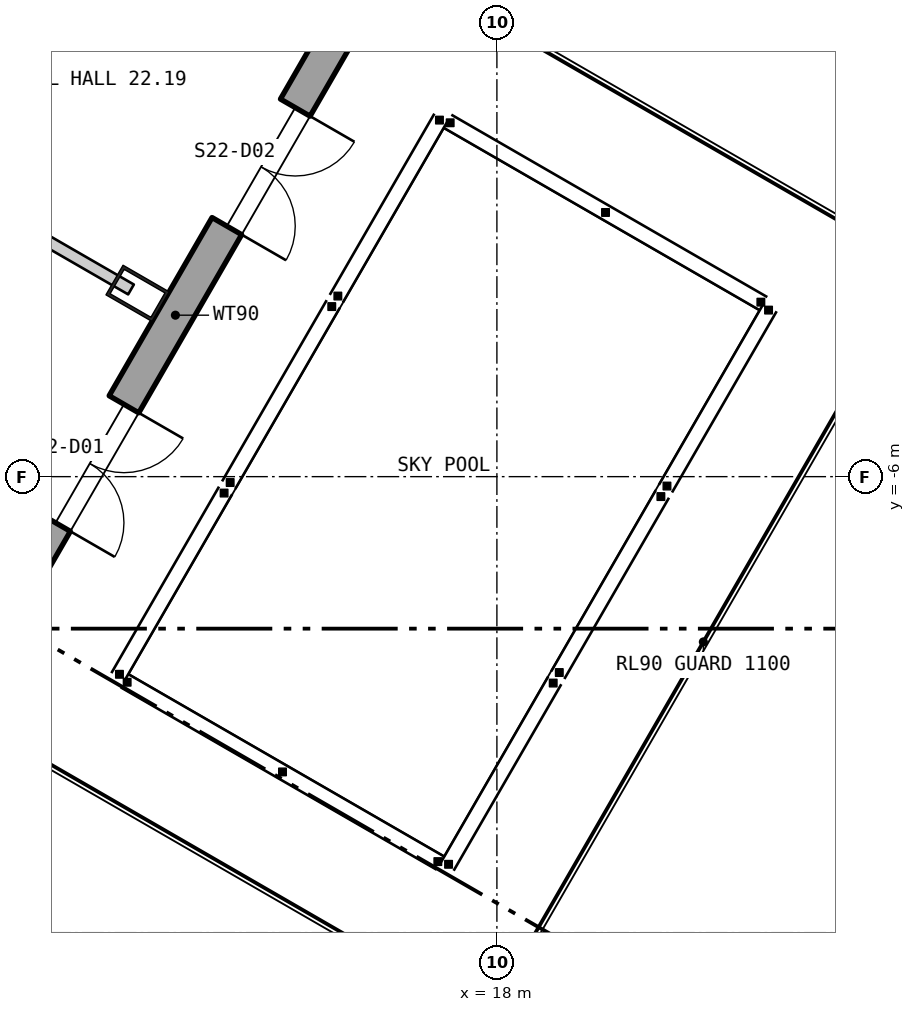
"""IFC4 building model, lengths in metres.
Left out: names, types, materials, properties, quantities, classifications, styles, units other than length and angle.
Written with IfcOpenShell. Run it as: python <this file> out.ifc"""

import sys

from ifc_helpers import new_model, si_unit, direction, frame, frame_2d, origin, origin_2d, place, context, subcontext, project, spatial, polyline, rectangle, hollow_rectangle, outline, extrude, element, fill, save


model = new_model("IFC4")
c1 = context("Model", 3, precision=1e-05, world=origin(), true_north=direction((0.0, 1.0)))
c2 = subcontext(c1, "Body", "Model", "MODEL_VIEW")
j1 = project(units=[si_unit("LENGTHUNIT", "METRE"), si_unit("PLANEANGLEUNIT", "RADIAN")], contexts=[c1])
p1 = place(None, origin())
s1 = spatial("IfcSite", under=j1, at=p1, CompositionType="ELEMENT")
p2 = place(p1, origin())
s2 = spatial("IfcBuilding", under=s1, at=p2, CompositionType="ELEMENT")
p3 = place(p2, frame((0.0, 0.0, 298.2)))
s3 = spatial("IfcBuildingStorey", under=s2, at=p3, CompositionType="ELEMENT", Elevation=298.2)
p4 = place(p3, frame((13.272, -3.588, 0.0), z_axis=(0.0, 0.0, 1.0), x_axis=(0.5, 0.866025403784, 0.0)))
e1 = element("IfcColumn", 1, at=p4, inside=s3, PredefinedType="COLUMN", context=c2, shape_type="SweptSolid", body=[
    extrude(hollow_rectangle(XDim=0.45, YDim=0.7, WallThickness=0.04, at=origin_2d()), origin(), (0.0, 0.0, 1.0), 6.0),
])
p5 = place(p3, frame((2.335, -23.682, -0.28), z_axis=(0.0, 0.0, 1.0), x_axis=(0.499999764979, 0.866025539474, 0.0)))
e2 = element("IfcWall", 2, at=p5, inside=s3, PredefinedType="SOLIDWALL", context=c2, shape_type="SweptSolid", body=[
    extrude(outline(polyline([(-0.13, -0.225), (45.87, -0.225), (45.61, 0.225), (0.13, 0.225), (-0.13, -0.225)])), origin(), (0.0, 0.0, 1.0), 6.1),
])
p6 = place(p5, frame((1.424, 0.0, 1.18)))
e3 = element("IfcOpeningElement", 3, at=p6, cuts=e2, PredefinedType="OPENING", context=c2, shape_type="SweptSolid", body=[
    extrude(rectangle(XDim=2.4, YDim=4.1, at=frame_2d((1.2, 2.05))), frame((0.0, 0.235, 0.0), z_axis=(0.0, -1.0, 0.0), x_axis=(1.0, 0.0, 0.0)), (0.0, 0.0, 1.0), 0.47),
])
p7 = place(p5, frame((5.893, 0.0, 1.18)))
e4 = element("IfcOpeningElement", 4, at=p7, cuts=e2, PredefinedType="OPENING", context=c2, shape_type="SweptSolid", body=[
    extrude(rectangle(XDim=2.4, YDim=4.1, at=frame_2d((1.2, 2.05))), frame((0.0, 0.235, 0.0), z_axis=(0.0, -1.0, 0.0), x_axis=(1.0, 0.0, 0.0)), (0.0, 0.0, 1.0), 0.47),
])
p8 = place(p5, frame((10.401, 0.0, 1.18)))
e5 = element("IfcOpeningElement", 5, at=p8, cuts=e2, PredefinedType="OPENING", context=c2, shape_type="SweptSolid", body=[
    extrude(rectangle(XDim=2.4, YDim=4.1, at=frame_2d((1.2, 2.05))), frame((0.0, 0.235, 0.0), z_axis=(0.0, -1.0, 0.0), x_axis=(1.0, 0.0, 0.0)), (0.0, 0.0, 1.0), 0.47),
])
p9 = place(p5, frame((14.909, 0.0, 1.18)))
e6 = element("IfcOpeningElement", 6, at=p9, cuts=e2, PredefinedType="OPENING", context=c2, shape_type="SweptSolid", body=[
    extrude(rectangle(XDim=2.4, YDim=4.1, at=frame_2d((1.2, 2.05))), frame((0.0, 0.235, 0.0), z_axis=(0.0, -1.0, 0.0), x_axis=(1.0, 0.0, 0.0)), (0.0, 0.0, 1.0), 0.47),
])
p10 = place(p5, frame((19.716, 0.0, 0.28)))
e7 = element("IfcOpeningElement", 7, at=p10, cuts=e2, PredefinedType="OPENING", context=c2, shape_type="SweptSolid", body=[
    extrude(rectangle(XDim=1.8, YDim=2.4, at=frame_2d((0.9, 1.2))), frame((0.0, 0.235, 0.0), z_axis=(0.0, -1.0, 0.0), x_axis=(1.0, 0.0, 0.0)), (0.0, 0.0, 1.0), 0.47),
])
p11 = place(p5, frame((24.224, 0.0, 0.28)))
e8 = element("IfcOpeningElement", 8, at=p11, cuts=e2, PredefinedType="OPENING", context=c2, shape_type="SweptSolid", body=[
    extrude(rectangle(XDim=1.8, YDim=2.4, at=frame_2d((0.9, 1.2))), frame((0.0, 0.235, 0.0), z_axis=(0.0, -1.0, 0.0), x_axis=(1.0, 0.0, 0.0)), (0.0, 0.0, 1.0), 0.47),
])
p12 = place(p5, frame((28.431, 0.0, 1.18)))
e9 = element("IfcOpeningElement", 9, at=p12, cuts=e2, PredefinedType="OPENING", context=c2, shape_type="SweptSolid", body=[
    extrude(rectangle(XDim=2.4, YDim=4.1, at=frame_2d((1.2, 2.05))), frame((0.0, 0.235, 0.0), z_axis=(0.0, -1.0, 0.0), x_axis=(1.0, 0.0, 0.0)), (0.0, 0.0, 1.0), 0.47),
])
p13 = place(p5, frame((32.939, 0.0, 1.18)))
e10 = element("IfcOpeningElement", 10, at=p13, cuts=e2, PredefinedType="OPENING", context=c2, shape_type="SweptSolid", body=[
    extrude(rectangle(XDim=2.4, YDim=4.1, at=frame_2d((1.2, 2.05))), frame((0.0, 0.235, 0.0), z_axis=(0.0, -1.0, 0.0), x_axis=(1.0, 0.0, 0.0)), (0.0, 0.0, 1.0), 0.47),
])
p14 = place(p5, frame((37.447, 0.0, 1.18)))
e11 = element("IfcOpeningElement", 11, at=p14, cuts=e2, PredefinedType="OPENING", context=c2, shape_type="SweptSolid", body=[
    extrude(rectangle(XDim=2.4, YDim=4.1, at=frame_2d((1.2, 2.05))), frame((0.0, 0.235, 0.0), z_axis=(0.0, -1.0, 0.0), x_axis=(1.0, 0.0, 0.0)), (0.0, 0.0, 1.0), 0.47),
])
p15 = place(p5, frame((41.916, 0.0, 1.18)))
e12 = element("IfcOpeningElement", 12, at=p15, cuts=e2, PredefinedType="OPENING", context=c2, shape_type="SweptSolid", body=[
    extrude(rectangle(XDim=2.4, YDim=4.1, at=frame_2d((1.2, 2.05))), frame((0.0, 0.235, 0.0), z_axis=(0.0, -1.0, 0.0), x_axis=(1.0, 0.0, 0.0)), (0.0, 0.0, 1.0), 0.47),
])
p16 = place(p3, frame((7.742, -0.396, 0.0), z_axis=(0.0, 0.0, 1.0), x_axis=(0.866169692731, -0.499750000894, 0.0)))
e13 = element("IfcWall", 13, at=p16, inside=s3, PredefinedType="PARTITIONING", context=c2, shape_type="SweptSolid", body=[
    extrude(rectangle(XDim=6.285, YDim=0.15, at=frame_2d((3.143, 0.0))), origin(), (0.0, 0.0, 1.0), 5.8),
])
p17 = place(p10, frame((1.8, 0.0, 0.0), z_axis=(0.0, 0.0, 1.0), x_axis=(-1.0, 0.0, 0.0)))
e14 = element("IfcDoor", 14, at=p17, inside=s3, OperationType="DOUBLE_DOOR_SINGLE_SWING", PredefinedType="DOOR", context=c2, shape_type="SweptSolid", body=[
    extrude(rectangle(XDim=1.8, YDim=2.4, at=frame_2d((0.9, 1.2))), frame((0.0, 0.025, 0.0), z_axis=(0.0, -1.0, 0.0), x_axis=(1.0, 0.0, 0.0)), (0.0, 0.0, 1.0), 0.05),
])
fill(e7, e14)
p18 = place(p11, frame((1.8, 0.0, 0.0), z_axis=(0.0, 0.0, 1.0), x_axis=(-1.0, 0.0, 0.0)))
e15 = element("IfcDoor", 15, at=p18, inside=s3, OperationType="DOUBLE_DOOR_SINGLE_SWING", PredefinedType="DOOR", context=c2, shape_type="SweptSolid", body=[
    extrude(rectangle(XDim=1.8, YDim=2.4, at=frame_2d((0.9, 1.2))), frame((0.0, 0.025, 0.0), z_axis=(0.0, -1.0, 0.0), x_axis=(1.0, 0.0, 0.0)), (0.0, 0.0, 1.0), 0.05),
])
fill(e8, e15)
save(model, sys.argv[1])
